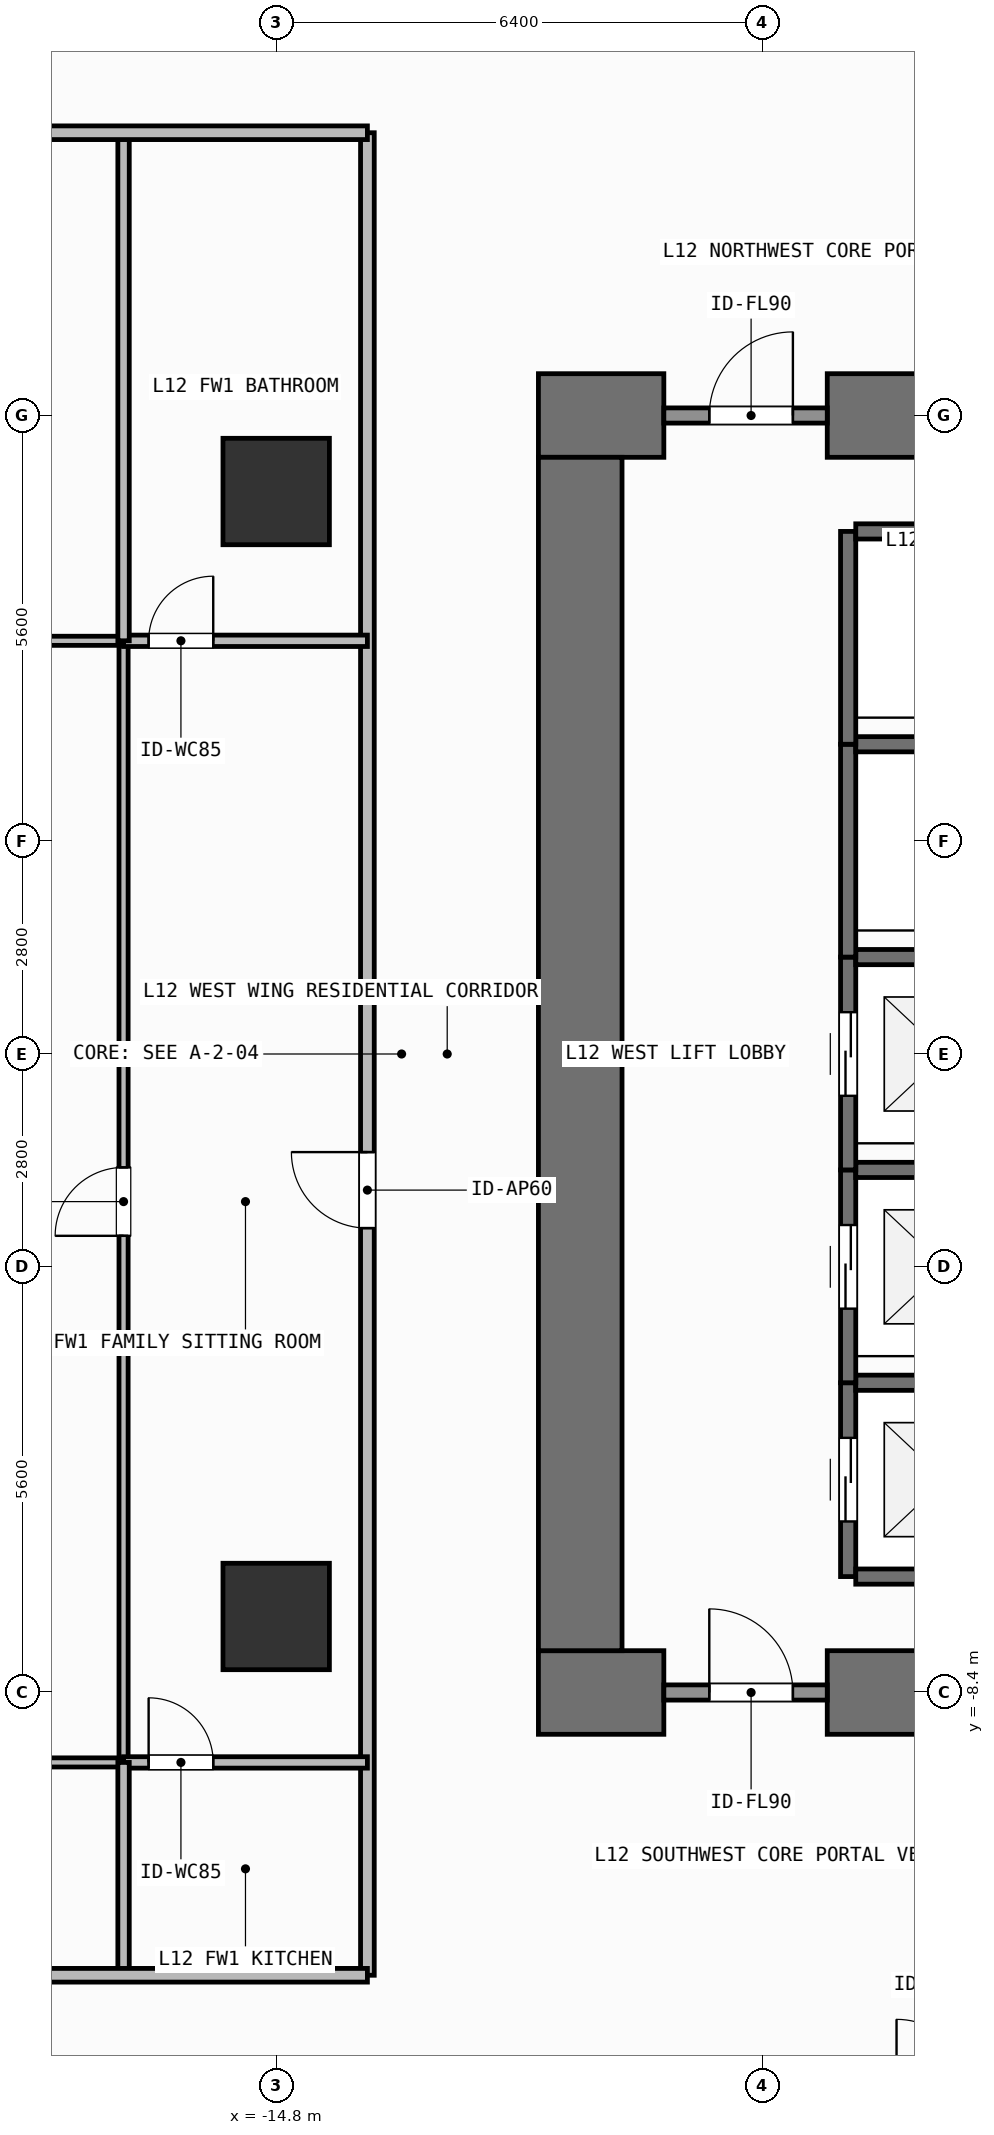
"""IFC4 building model, lengths in metres.
Left out: names, types, materials, properties, quantities, classifications, styles, units other than length and angle.
Written with IfcOpenShell. Run it as: python <this file> out.ifc"""

import sys

from ifc_helpers import new_model, si_unit, direction, frame, frame_2d, origin, origin_2d, place, context, subcontext, project, spatial, rectangle, extrude, element, fill, save


model = new_model("IFC4")
c1 = context("Model", 3, precision=1e-05, world=origin(), true_north=direction((0.0, 1.0)))
c2 = subcontext(c1, "Body", "Model", "MODEL_VIEW")
j1 = project(units=[si_unit("LENGTHUNIT", "METRE"), si_unit("PLANEANGLEUNIT", "RADIAN")], contexts=[c1])
p1 = place(None, origin())
s1 = spatial("IfcSite", under=j1, at=p1, CompositionType="ELEMENT")
p2 = place(p1, origin())
s2 = spatial("IfcBuilding", under=s1, at=p2, CompositionType="ELEMENT")
p3 = place(p2, frame((0.0, 0.0, 46.2)))
s3 = spatial("IfcBuildingStorey", under=s2, at=p3, CompositionType="ELEMENT", Elevation=46.2)
p4 = place(p3, frame((-11.35, -8.4, 0.0), z_axis=(0.0, 0.0, 1.0), x_axis=(1.0, 0.0, 0.0)))
e1 = element("IfcWall", 1, at=p4, inside=s3, PredefinedType="SHEAR", context=c2, shape_type="SweptSolid", body=[
    extrude(rectangle(XDim=1.65, YDim=1.1, at=frame_2d((0.825, 0.0))), origin(), (0.0, 0.0, 1.0), 3.9),
])
p5 = place(p3, frame((-7.55, -8.4, 0.0), z_axis=(0.0, 0.0, 1.0), x_axis=(1.0, 0.0, 0.0)))
e2 = element("IfcWall", 2, at=p5, inside=s3, PredefinedType="SHEAR", context=c2, shape_type="SweptSolid", body=[
    extrude(rectangle(XDim=3.35, YDim=1.1, at=frame_2d((1.675, 0.0))), origin(), (0.0, 0.0, 1.0), 3.9),
])
p6 = place(p3, frame((-11.35, 8.4, 0.0), z_axis=(0.0, 0.0, 1.0), x_axis=(1.0, 0.0, 0.0)))
e3 = element("IfcWall", 3, at=p6, inside=s3, PredefinedType="SHEAR", context=c2, shape_type="SweptSolid", body=[
    extrude(rectangle(XDim=1.65, YDim=1.1, at=frame_2d((0.825, 0.0))), origin(), (0.0, 0.0, 1.0), 3.9),
])
p7 = place(p3, frame((-7.55, 8.4, 0.0), z_axis=(0.0, 0.0, 1.0), x_axis=(1.0, 0.0, 0.0)))
e4 = element("IfcWall", 4, at=p7, inside=s3, PredefinedType="SHEAR", context=c2, shape_type="SweptSolid", body=[
    extrude(rectangle(XDim=16.5, YDim=1.1, at=frame_2d((8.25, 0.0))), origin(), (0.0, 0.0, 1.0), 3.9),
])
p8 = place(p3, frame((-10.8, -7.85, 0.0), z_axis=(0.0, 0.0, 1.0), x_axis=(0.0, 1.0, 0.0)))
e5 = element("IfcWall", 5, at=p8, inside=s3, PredefinedType="SHEAR", context=c2, shape_type="SweptSolid", body=[
    extrude(rectangle(XDim=15.7, YDim=1.1, at=frame_2d((7.85, 0.0))), origin(), (0.0, 0.0, 1.0), 3.9),
])
for number, where, z_axis, x_axis in (
    (6, (-14.8, -7.4, 0.0), (0.0, 0.0, 1.0), (1.0, 0.0, 0.0)),
    (7, (-14.8, 7.4, 0.0), (0.0, 0.0, 1.0), (1.0, 0.0, 0.0)),
):
    element("IfcColumn", number, at=place(p3, frame(where, z_axis=z_axis, x_axis=x_axis)), inside=s3, PredefinedType="COLUMN", context=c2, shape_type="SweptSolid", body=[
        extrude(rectangle(XDim=1.4, YDim=1.4, at=origin_2d()), origin(), (0.0, 0.0, 1.0), 3.9),
    ])
p9 = place(p3, frame((-7.275, -6.875, 0.0), z_axis=(0.0, 0.0, 1.0), x_axis=(0.0, 1.0, 0.0)))
e8 = element("IfcWall", 8, at=p9, inside=s3, PredefinedType="SHEAR", context=c2, shape_type="SweptSolid", body=[
    extrude(rectangle(XDim=2.55, YDim=0.2, at=frame_2d((1.275, 0.0))), origin(), (0.0, 0.0, 1.0), 3.68),
])
p10 = place(p9, frame((0.725, 0.0, 0.0)))
e9 = element("IfcOpeningElement", 9, at=p10, cuts=e8, PredefinedType="OPENING", context=c2, shape_type="SweptSolid", body=[
    extrude(rectangle(XDim=1.1, YDim=2.2, at=frame_2d((0.55, 1.1))), frame((0.0, 0.11, 0.0), z_axis=(0.0, -1.0, 0.0), x_axis=(1.0, 0.0, 0.0)), (0.0, 0.0, 1.0), 0.22),
])
for number, where, z_axis, x_axis in (
    (10, (-7.175, -6.875, 0.0), (0.0, 0.0, 1.0), (1.0, 0.0, 0.0)),
    (11, (-7.175, -4.325, 0.0), (0.0, 0.0, 1.0), (1.0, 0.0, 0.0)),
):
    element("IfcWall", number, at=place(p3, frame(where, z_axis=z_axis, x_axis=x_axis)), inside=s3, PredefinedType="SHEAR", context=c2, shape_type="SweptSolid", body=[
        extrude(rectangle(XDim=2.35, YDim=0.2, at=frame_2d((1.175, 0.0))), origin(), (0.0, 0.0, 1.0), 3.68),
    ])
p11 = place(p3, frame((-7.275, -4.325, 0.0), z_axis=(0.0, 0.0, 1.0), x_axis=(0.0, 1.0, 0.0)))
e12 = element("IfcWall", 12, at=p11, inside=s3, PredefinedType="SHEAR", context=c2, shape_type="SweptSolid", body=[
    extrude(rectangle(XDim=2.8, YDim=0.2, at=frame_2d((1.4, 0.0))), origin(), (0.0, 0.0, 1.0), 3.68),
])
p12 = place(p11, frame((0.975, 0.0, 0.0)))
e13 = element("IfcOpeningElement", 13, at=p12, cuts=e12, PredefinedType="OPENING", context=c2, shape_type="SweptSolid", body=[
    extrude(rectangle(XDim=1.1, YDim=2.2, at=frame_2d((0.55, 1.1))), frame((0.0, 0.11, 0.0), z_axis=(0.0, -1.0, 0.0), x_axis=(1.0, 0.0, 0.0)), (0.0, 0.0, 1.0), 0.22),
])
p13 = place(p3, frame((-7.175, -1.525, 0.0), z_axis=(0.0, 0.0, 1.0), x_axis=(1.0, 0.0, 0.0)))
e14 = element("IfcWall", 14, at=p13, inside=s3, PredefinedType="SHEAR", context=c2, shape_type="SweptSolid", body=[
    extrude(rectangle(XDim=2.35, YDim=0.2, at=frame_2d((1.175, 0.0))), origin(), (0.0, 0.0, 1.0), 3.68),
])
p14 = place(p3, frame((-7.275, -1.525, 0.0), z_axis=(0.0, 0.0, 1.0), x_axis=(0.0, 1.0, 0.0)))
e15 = element("IfcWall", 15, at=p14, inside=s3, PredefinedType="SHEAR", context=c2, shape_type="SweptSolid", body=[
    extrude(rectangle(XDim=2.8, YDim=0.2, at=frame_2d((1.4, 0.0))), origin(), (0.0, 0.0, 1.0), 3.68),
])
p15 = place(p14, frame((0.975, 0.0, 0.0)))
e16 = element("IfcOpeningElement", 16, at=p15, cuts=e15, PredefinedType="OPENING", context=c2, shape_type="SweptSolid", body=[
    extrude(rectangle(XDim=1.1, YDim=2.2, at=frame_2d((0.55, 1.1))), frame((0.0, 0.11, 0.0), z_axis=(0.0, -1.0, 0.0), x_axis=(1.0, 0.0, 0.0)), (0.0, 0.0, 1.0), 0.22),
])
p16 = place(p3, frame((-7.175, 1.275, 0.0), z_axis=(0.0, 0.0, 1.0), x_axis=(1.0, 0.0, 0.0)))
e17 = element("IfcWall", 17, at=p16, inside=s3, PredefinedType="SHEAR", context=c2, shape_type="SweptSolid", body=[
    extrude(rectangle(XDim=2.35, YDim=0.2, at=frame_2d((1.175, 0.0))), origin(), (0.0, 0.0, 1.0), 3.68),
])
p17 = place(p3, frame((-7.275, 1.275, 0.0), z_axis=(0.0, 0.0, 1.0), x_axis=(0.0, 1.0, 0.0)))
e18 = element("IfcWall", 18, at=p17, inside=s3, PredefinedType="SHEAR", context=c2, shape_type="SweptSolid", body=[
    extrude(rectangle(XDim=2.8, YDim=0.2, at=frame_2d((1.4, 0.0))), origin(), (0.0, 0.0, 1.0), 3.68),
])
p18 = place(p3, frame((-7.175, 4.075, 0.0), z_axis=(0.0, 0.0, 1.0), x_axis=(1.0, 0.0, 0.0)))
e19 = element("IfcWall", 19, at=p18, inside=s3, PredefinedType="SHEAR", context=c2, shape_type="SweptSolid", body=[
    extrude(rectangle(XDim=2.35, YDim=0.2, at=frame_2d((1.175, 0.0))), origin(), (0.0, 0.0, 1.0), 3.68),
])
p19 = place(p3, frame((-7.275, 4.075, 0.0), z_axis=(0.0, 0.0, 1.0), x_axis=(0.0, 1.0, 0.0)))
e20 = element("IfcWall", 20, at=p19, inside=s3, PredefinedType="SHEAR", context=c2, shape_type="SweptSolid", body=[
    extrude(rectangle(XDim=2.8, YDim=0.2, at=frame_2d((1.4, 0.0))), origin(), (0.0, 0.0, 1.0), 3.68),
])
p20 = place(p3, frame((-7.175, 6.875, 0.0), z_axis=(0.0, 0.0, 1.0), x_axis=(1.0, 0.0, 0.0)))
e21 = element("IfcWall", 21, at=p20, inside=s3, PredefinedType="SHEAR", context=c2, shape_type="SweptSolid", body=[
    extrude(rectangle(XDim=2.35, YDim=0.2, at=frame_2d((1.175, 0.0))), origin(), (0.0, 0.0, 1.0), 3.68),
])
p21 = place(p3, frame((-9.7, -8.4, 0.0), z_axis=(0.0, 0.0, 1.0), x_axis=(1.0, 0.0, 0.0)))
e22 = element("IfcWall", 22, at=p21, inside=s3, PredefinedType="SOLIDWALL", context=c2, shape_type="SweptSolid", body=[
    extrude(rectangle(XDim=2.15, YDim=0.2, at=frame_2d((1.075, 0.0))), origin(), (0.0, 0.0, 1.0), 2.72),
])
p22 = place(p21, frame((0.598, 0.0, 0.0)))
e23 = element("IfcOpeningElement", 23, at=p22, cuts=e22, PredefinedType="OPENING", context=c2, shape_type="SweptSolid", body=[
    extrude(rectangle(XDim=1.1, YDim=2.15, at=frame_2d((0.55, 1.075))), frame((0.0, 0.11, 0.0), z_axis=(0.0, -1.0, 0.0), x_axis=(1.0, 0.0, 0.0)), (0.0, 0.0, 1.0), 0.22),
])
p23 = place(p3, frame((-9.7, 8.4, 0.0), z_axis=(0.0, 0.0, 1.0), x_axis=(1.0, 0.0, 0.0)))
e24 = element("IfcWall", 24, at=p23, inside=s3, PredefinedType="SOLIDWALL", context=c2, shape_type="SweptSolid", body=[
    extrude(rectangle(XDim=2.15, YDim=0.2, at=frame_2d((1.075, 0.0))), origin(), (0.0, 0.0, 1.0), 2.72),
])
p24 = place(p23, frame((0.598, 0.0, 0.0)))
e25 = element("IfcOpeningElement", 25, at=p24, cuts=e24, PredefinedType="OPENING", context=c2, shape_type="SweptSolid", body=[
    extrude(rectangle(XDim=1.1, YDim=2.15, at=frame_2d((0.55, 1.075))), frame((0.0, 0.11, 0.0), z_axis=(0.0, -1.0, 0.0), x_axis=(1.0, 0.0, 0.0)), (0.0, 0.0, 1.0), 0.22),
])
p25 = place(p3, frame((-13.6, -12.12, 0.0), z_axis=(0.0, 0.0, 1.0), x_axis=(0.0, 1.0, 0.0)))
e26 = element("IfcWall", 26, at=p25, inside=s3, PredefinedType="PARTITIONING", context=c2, shape_type="SweptSolid", body=[
    extrude(rectangle(XDim=24.24, YDim=0.18, at=frame_2d((12.12, 0.0))), origin(), (0.0, 0.0, 1.0), 3.68),
])
p26 = place(p25, frame((9.829, 0.0, 0.0)))
e27 = element("IfcOpeningElement", 27, at=p26, cuts=e26, PredefinedType="OPENING", context=c2, shape_type="SweptSolid", body=[
    extrude(rectangle(XDim=1.0, YDim=2.2, at=frame_2d((0.5, 1.1))), frame((0.0, 0.1, 0.0), z_axis=(0.0, -1.0, 0.0), x_axis=(1.0, 0.0, 0.0)), (0.0, 0.0, 1.0), 0.2),
])
p27 = place(p3, frame((-16.808, -9.32, 0.0), z_axis=(0.0, 0.0, 1.0), x_axis=(0.0, 1.0, 0.0)))
e28 = element("IfcWall", 28, at=p27, inside=s3, PredefinedType="PARTITIONING", context=c2, shape_type="SweptSolid", body=[
    extrude(rectangle(XDim=14.756, YDim=0.12, at=frame_2d((7.378, 0.0))), origin(), (0.0, 0.0, 1.0), 3.68),
])
p28 = place(p27, frame((6.928, 0.0, 0.0)))
e29 = element("IfcOpeningElement", 29, at=p28, cuts=e28, PredefinedType="OPENING", context=c2, shape_type="SweptSolid", body=[
    extrude(rectangle(XDim=0.9, YDim=2.1, at=frame_2d((0.45, 1.05))), frame((0.0, 0.07, 0.0), z_axis=(0.0, -1.0, 0.0), x_axis=(1.0, 0.0, 0.0)), (0.0, 0.0, 1.0), 0.14),
])
p29 = place(p3, frame((-16.808, 5.436, 0.0), z_axis=(0.0, 0.0, 1.0), x_axis=(1.0, 0.0, 0.0)))
e30 = element("IfcWall", 30, at=p29, inside=s3, PredefinedType="PARTITIONING", context=c2, shape_type="SweptSolid", body=[
    extrude(rectangle(XDim=3.208, YDim=0.15, at=frame_2d((1.604, 0.0))), origin(), (0.0, 0.0, 1.0), 3.68),
])
p30 = place(p29, frame((0.33, 0.0, 0.0)))
e31 = element("IfcOpeningElement", 31, at=p30, cuts=e30, PredefinedType="OPENING", context=c2, shape_type="SweptSolid", body=[
    extrude(rectangle(XDim=0.85, YDim=2.1, at=frame_2d((0.425, 1.05))), frame((0.0, 0.085, 0.0), z_axis=(0.0, -1.0, 0.0), x_axis=(1.0, 0.0, 0.0)), (0.0, 0.0, 1.0), 0.17),
])
p31 = place(p3, frame((-16.808, -9.32, 0.0), z_axis=(0.0, 0.0, 1.0), x_axis=(1.0, 0.0, 0.0)))
e32 = element("IfcWall", 32, at=p31, inside=s3, PredefinedType="PARTITIONING", context=c2, shape_type="SweptSolid", body=[
    extrude(rectangle(XDim=3.208, YDim=0.15, at=frame_2d((1.604, 0.0))), origin(), (0.0, 0.0, 1.0), 3.68),
])
p32 = place(p31, frame((0.33, 0.0, 0.0)))
e33 = element("IfcOpeningElement", 33, at=p32, cuts=e32, PredefinedType="OPENING", context=c2, shape_type="SweptSolid", body=[
    extrude(rectangle(XDim=0.85, YDim=2.1, at=frame_2d((0.425, 1.05))), frame((0.0, 0.085, 0.0), z_axis=(0.0, -1.0, 0.0), x_axis=(1.0, 0.0, 0.0)), (0.0, 0.0, 1.0), 0.17),
])
p33 = place(p3, frame((-22.13, -9.32, 0.0), z_axis=(0.0, 0.0, 1.0), x_axis=(1.0, 0.0, 0.0)))
e34 = element("IfcWall", 34, at=p33, inside=s3, PredefinedType="PARTITIONING", context=c2, shape_type="SweptSolid", body=[
    extrude(rectangle(XDim=5.322, YDim=0.12, at=frame_2d((2.661, 0.0))), origin(), (0.0, 0.0, 1.0), 3.68),
])
p34 = place(p33, frame((1.765, 0.0, 0.0)))
e35 = element("IfcOpeningElement", 35, at=p34, cuts=e34, PredefinedType="OPENING", context=c2, shape_type="SweptSolid", body=[
    extrude(rectangle(XDim=0.9, YDim=2.1, at=frame_2d((0.45, 1.05))), frame((0.0, 0.07, 0.0), z_axis=(0.0, -1.0, 0.0), x_axis=(1.0, 0.0, 0.0)), (0.0, 0.0, 1.0), 0.14),
])
p35 = place(p3, frame((-22.13, 5.436, 0.0), z_axis=(0.0, 0.0, 1.0), x_axis=(1.0, 0.0, 0.0)))
e36 = element("IfcWall", 36, at=p35, inside=s3, PredefinedType="PARTITIONING", context=c2, shape_type="SweptSolid", body=[
    extrude(rectangle(XDim=5.322, YDim=0.12, at=frame_2d((2.661, 0.0))), origin(), (0.0, 0.0, 1.0), 3.68),
])
p36 = place(p35, frame((1.765, 0.0, 0.0)))
e37 = element("IfcOpeningElement", 37, at=p36, cuts=e36, PredefinedType="OPENING", context=c2, shape_type="SweptSolid", body=[
    extrude(rectangle(XDim=0.9, YDim=2.1, at=frame_2d((0.45, 1.05))), frame((0.0, 0.07, 0.0), z_axis=(0.0, -1.0, 0.0), x_axis=(1.0, 0.0, 0.0)), (0.0, 0.0, 1.0), 0.14),
])
p37 = place(p3, frame((-16.808, -12.12, 0.0), z_axis=(0.0, 0.0, 1.0), x_axis=(0.0, 1.0, 0.0)))
e38 = element("IfcWall", 38, at=p37, inside=s3, PredefinedType="PARTITIONING", context=c2, shape_type="SweptSolid", body=[
    extrude(rectangle(XDim=2.8, YDim=0.15, at=frame_2d((1.4, 0.0))), origin(), (0.0, 0.0, 1.0), 3.68),
])
p38 = place(p3, frame((-16.808, 5.436, 0.0), z_axis=(0.0, 0.0, 1.0), x_axis=(0.0, 1.0, 0.0)))
e39 = element("IfcWall", 39, at=p38, inside=s3, PredefinedType="PARTITIONING", context=c2, shape_type="SweptSolid", body=[
    extrude(rectangle(XDim=6.684, YDim=0.15, at=frame_2d((3.342, 0.0))), origin(), (0.0, 0.0, 1.0), 3.68),
])
for number, where, z_axis, x_axis in (
    (40, (-22.13, -12.12, 0.0), (0.0, 0.0, 1.0), (1.0, 0.0, 0.0)),
    (41, (-22.13, 12.12, 0.0), (0.0, 0.0, 1.0), (1.0, 0.0, 0.0)),
):
    element("IfcWall", number, at=place(p3, frame(where, z_axis=z_axis, x_axis=x_axis)), inside=s3, PredefinedType="PARTITIONING", context=c2, shape_type="SweptSolid", body=[
        extrude(rectangle(XDim=8.53, YDim=0.18, at=frame_2d((4.265, 0.0))), origin(), (0.0, 0.0, 1.0), 3.68),
    ])
p39 = place(p10, origin())
e42 = element("IfcDoor", 42, at=p39, inside=s3, OperationType="SLIDING_TO_LEFT", PredefinedType="DOOR", context=c2, shape_type="SweptSolid", body=[
    extrude(rectangle(XDim=1.1, YDim=2.2, at=frame_2d((0.55, 1.1))), frame((0.0, 0.025, 0.0), z_axis=(0.0, -1.0, 0.0), x_axis=(1.0, 0.0, 0.0)), (0.0, 0.0, 1.0), 0.05),
])
fill(e9, e42)
p40 = place(p12, origin())
e43 = element("IfcDoor", 43, at=p40, inside=s3, OperationType="SLIDING_TO_LEFT", PredefinedType="DOOR", context=c2, shape_type="SweptSolid", body=[
    extrude(rectangle(XDim=1.1, YDim=2.2, at=frame_2d((0.55, 1.1))), frame((0.0, 0.025, 0.0), z_axis=(0.0, -1.0, 0.0), x_axis=(1.0, 0.0, 0.0)), (0.0, 0.0, 1.0), 0.05),
])
fill(e13, e43)
p41 = place(p15, origin())
e44 = element("IfcDoor", 44, at=p41, inside=s3, OperationType="SLIDING_TO_LEFT", PredefinedType="DOOR", context=c2, shape_type="SweptSolid", body=[
    extrude(rectangle(XDim=1.1, YDim=2.2, at=frame_2d((0.55, 1.1))), frame((0.0, 0.025, 0.0), z_axis=(0.0, -1.0, 0.0), x_axis=(1.0, 0.0, 0.0)), (0.0, 0.0, 1.0), 0.05),
])
fill(e16, e44)
p42 = place(p22, origin())
e45 = element("IfcDoor", 45, at=p42, inside=s3, OperationType="SINGLE_SWING_LEFT", PredefinedType="DOOR", context=c2, shape_type="SweptSolid", body=[
    extrude(rectangle(XDim=1.1, YDim=2.15, at=frame_2d((0.55, 1.075))), frame((0.0, 0.025, 0.0), z_axis=(0.0, -1.0, 0.0), x_axis=(1.0, 0.0, 0.0)), (0.0, 0.0, 1.0), 0.05),
])
fill(e23, e45)
p43 = place(p24, origin())
e46 = element("IfcDoor", 46, at=p43, inside=s3, OperationType="SINGLE_SWING_RIGHT", PredefinedType="DOOR", context=c2, shape_type="SweptSolid", body=[
    extrude(rectangle(XDim=1.1, YDim=2.15, at=frame_2d((0.55, 1.075))), frame((0.0, 0.025, 0.0), z_axis=(0.0, -1.0, 0.0), x_axis=(1.0, 0.0, 0.0)), (0.0, 0.0, 1.0), 0.05),
])
fill(e25, e46)
p44 = place(p26, origin())
e47 = element("IfcDoor", 47, at=p44, inside=s3, OperationType="SINGLE_SWING_RIGHT", PredefinedType="DOOR", context=c2, shape_type="SweptSolid", body=[
    extrude(rectangle(XDim=1.0, YDim=2.2, at=frame_2d((0.5, 1.1))), frame((0.0, 0.025, 0.0), z_axis=(0.0, -1.0, 0.0), x_axis=(1.0, 0.0, 0.0)), (0.0, 0.0, 1.0), 0.05),
])
fill(e27, e47)
p45 = place(p28, origin())
e48 = element("IfcDoor", 48, at=p45, inside=s3, OperationType="SINGLE_SWING_LEFT", PredefinedType="DOOR", context=c2, shape_type="SweptSolid", body=[
    extrude(rectangle(XDim=0.9, YDim=2.1, at=frame_2d((0.45, 1.05))), frame((0.0, 0.025, 0.0), z_axis=(0.0, -1.0, 0.0), x_axis=(1.0, 0.0, 0.0)), (0.0, 0.0, 1.0), 0.05),
])
fill(e29, e48)
p46 = place(p30, origin())
e49 = element("IfcDoor", 49, at=p46, inside=s3, OperationType="SINGLE_SWING_RIGHT", PredefinedType="DOOR", context=c2, shape_type="SweptSolid", body=[
    extrude(rectangle(XDim=0.85, YDim=2.1, at=frame_2d((0.425, 1.05))), frame((0.0, 0.025, 0.0), z_axis=(0.0, -1.0, 0.0), x_axis=(1.0, 0.0, 0.0)), (0.0, 0.0, 1.0), 0.05),
])
fill(e31, e49)
p47 = place(p32, origin())
e50 = element("IfcDoor", 50, at=p47, inside=s3, OperationType="SINGLE_SWING_LEFT", PredefinedType="DOOR", context=c2, shape_type="SweptSolid", body=[
    extrude(rectangle(XDim=0.85, YDim=2.1, at=frame_2d((0.425, 1.05))), frame((0.0, 0.025, 0.0), z_axis=(0.0, -1.0, 0.0), x_axis=(1.0, 0.0, 0.0)), (0.0, 0.0, 1.0), 0.05),
])
fill(e33, e50)
save(model, sys.argv[1])
